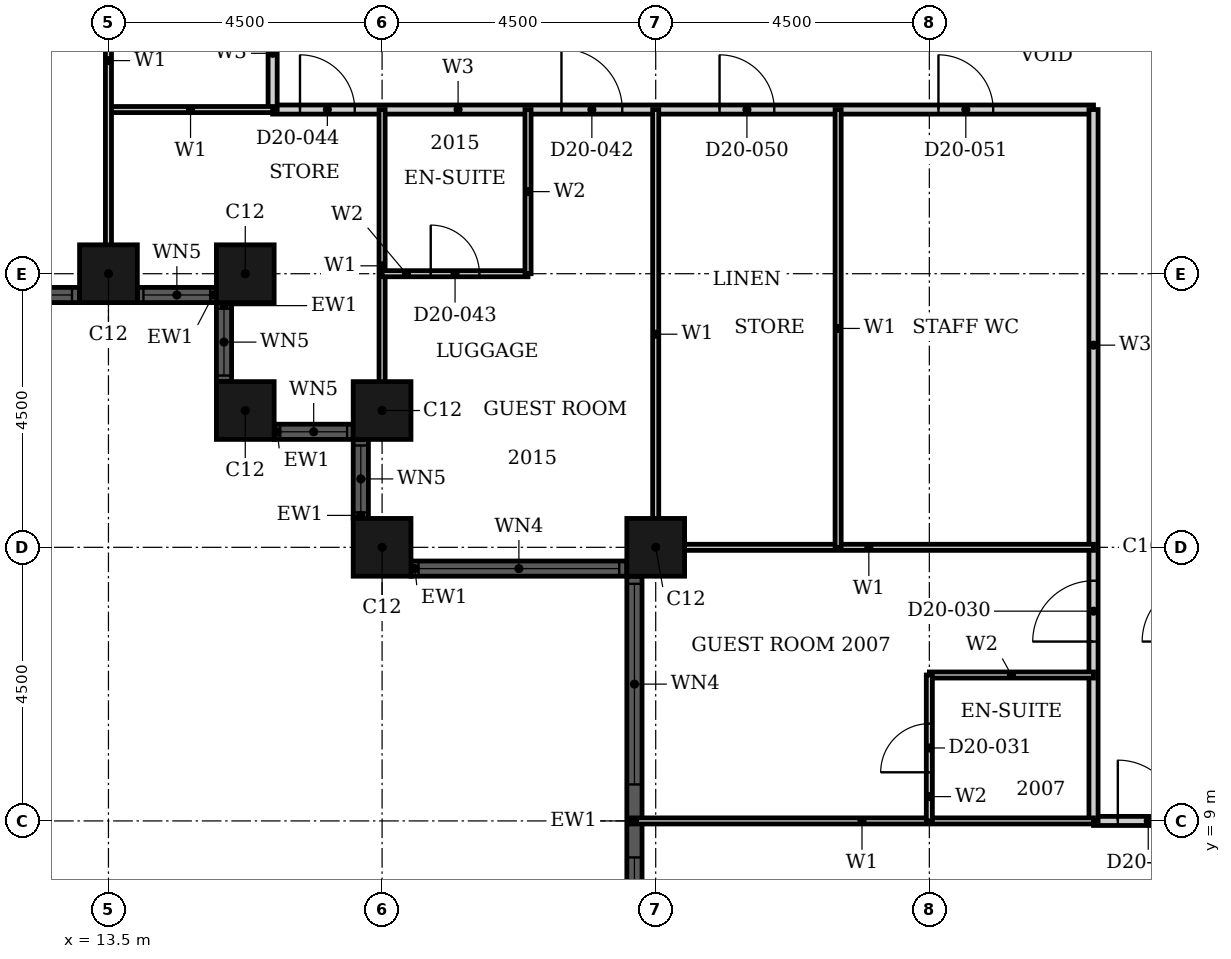
"""IFC4 building model, lengths in metres.
Left out: names, types, materials, properties, quantities, classifications, styles, units other than length and angle.
Written with IfcOpenShell. Run it as: python <this file> out.ifc"""

import sys

from ifc_helpers import new_model, si_unit, direction, frame, frame_2d, origin, origin_2d, place, context, subcontext, project, spatial, rectangle, hollow_rectangle, extrude, element, fill, save


model = new_model("IFC4")
c1 = context("Model", 3, precision=1e-05, world=origin(), true_north=direction((0.0, 1.0)))
c2 = subcontext(c1, "Body", "Model", "MODEL_VIEW")
j1 = project(units=[si_unit("LENGTHUNIT", "METRE"), si_unit("PLANEANGLEUNIT", "RADIAN")], contexts=[c1])
p1 = place(None, origin())
s1 = spatial("IfcSite", under=j1, at=p1, CompositionType="ELEMENT")
p2 = place(p1, origin())
s2 = spatial("IfcBuilding", under=s1, at=p2, CompositionType="ELEMENT")
p3 = place(p2, frame((0.0, 0.0, 85.2)))
s3 = spatial("IfcBuildingStorey", under=s2, at=p3, CompositionType="ELEMENT", Elevation=85.2)
for number, where, z_axis, x_axis in (
    (1, (13.5, 18.0, 0.0), (0.0, 0.0, 1.0), (1.0, 0.0, 0.0)),
    (2, (15.75, 18.0, 0.0), (0.0, 0.0, 1.0), (1.0, 0.0, 0.0)),
    (3, (15.75, 15.75, 0.0), (0.0, 0.0, 1.0), (1.0, 0.0, 0.0)),
    (4, (18.0, 15.75, 0.0), (0.0, 0.0, 1.0), (1.0, 0.0, 0.0)),
    (5, (18.0, 13.5, 0.0), (0.0, 0.0, 1.0), (1.0, 0.0, 0.0)),
    (6, (22.5, 13.5, 0.0), (0.0, 0.0, 1.0), (1.0, 0.0, 0.0)),
):
    element("IfcColumn", number, at=place(p3, frame(where, z_axis=z_axis, x_axis=x_axis)), inside=s3, PredefinedType="COLUMN", context=c2, shape_type="SweptSolid", body=[
        extrude(hollow_rectangle(XDim=0.95, YDim=0.95, WallThickness=0.03, at=origin_2d()), origin(), (0.0, 0.0, 1.0), 3.6),
    ])
p4 = place(p3, frame((4.975, 17.65, 0.0), z_axis=(0.0, 0.0, 1.0), x_axis=(1.0, 0.0, 0.0)))
e7 = element("IfcWall", 7, at=p4, inside=s3, PredefinedType="SOLIDWALL", context=c2, shape_type="SweptSolid", body=[
    extrude(rectangle(XDim=8.05, YDim=0.25, at=frame_2d((4.025, 0.0))), origin(), (0.0, 0.0, 1.0), 3.6),
])
p5 = place(p4, frame((0.125, 0.0, 0.9)))
e8 = element("IfcOpeningElement", 8, at=p5, cuts=e7, PredefinedType="OPENING", context=c2, shape_type="SweptSolid", body=[
    extrude(rectangle(XDim=3.3, YDim=2.08, at=frame_2d((1.65, 1.04))), frame((0.0, 0.135, 0.0), z_axis=(0.0, -1.0, 0.0), x_axis=(1.0, 0.0, 0.0)), (0.0, 0.0, 1.0), 0.27),
])
p6 = place(p4, frame((4.625, 0.0, 0.9)))
e9 = element("IfcOpeningElement", 9, at=p6, cuts=e7, PredefinedType="OPENING", context=c2, shape_type="SweptSolid", body=[
    extrude(rectangle(XDim=3.3, YDim=2.08, at=frame_2d((1.65, 1.04))), frame((0.0, 0.135, 0.0), z_axis=(0.0, -1.0, 0.0), x_axis=(1.0, 0.0, 0.0)), (0.0, 0.0, 1.0), 0.27),
])
p7 = place(p3, frame((13.975, 17.65, 0.0), z_axis=(0.0, 0.0, 1.0), x_axis=(1.0, 0.0, 0.0)))
e10 = element("IfcWall", 10, at=p7, inside=s3, PredefinedType="SOLIDWALL", context=c2, shape_type="SweptSolid", body=[
    extrude(rectangle(XDim=1.3, YDim=0.25, at=frame_2d((0.65, 0.0))), origin(), (0.0, 0.0, 1.0), 3.6),
])
p8 = place(p7, frame((0.1, 0.0, 0.9)))
e11 = element("IfcOpeningElement", 11, at=p8, cuts=e10, PredefinedType="OPENING", context=c2, shape_type="SweptSolid", body=[
    extrude(rectangle(XDim=1.1, YDim=2.08, at=frame_2d((0.55, 1.04))), frame((0.0, 0.135, 0.0), z_axis=(0.0, -1.0, 0.0), x_axis=(1.0, 0.0, 0.0)), (0.0, 0.0, 1.0), 0.27),
])
p9 = place(p3, frame((15.4, 17.525, 0.0), z_axis=(0.0, 0.0, 1.0), x_axis=(0.0, -1.0, 0.0)))
e12 = element("IfcWall", 12, at=p9, inside=s3, PredefinedType="SOLIDWALL", context=c2, shape_type="SweptSolid", body=[
    extrude(rectangle(XDim=1.3, YDim=0.25, at=frame_2d((0.65, 0.0))), origin(), (0.0, 0.0, 1.0), 3.6),
])
p10 = place(p9, frame((0.1, 0.0, 0.9)))
e13 = element("IfcOpeningElement", 13, at=p10, cuts=e12, PredefinedType="OPENING", context=c2, shape_type="SweptSolid", body=[
    extrude(rectangle(XDim=1.1, YDim=2.08, at=frame_2d((0.55, 1.04))), frame((0.0, 0.135, 0.0), z_axis=(0.0, -1.0, 0.0), x_axis=(1.0, 0.0, 0.0)), (0.0, 0.0, 1.0), 0.27),
])
p11 = place(p3, frame((16.225, 15.4, 0.0), z_axis=(0.0, 0.0, 1.0), x_axis=(1.0, 0.0, 0.0)))
e14 = element("IfcWall", 14, at=p11, inside=s3, PredefinedType="SOLIDWALL", context=c2, shape_type="SweptSolid", body=[
    extrude(rectangle(XDim=1.3, YDim=0.25, at=frame_2d((0.65, 0.0))), origin(), (0.0, 0.0, 1.0), 3.6),
])
p12 = place(p11, frame((0.1, 0.0, 0.9)))
e15 = element("IfcOpeningElement", 15, at=p12, cuts=e14, PredefinedType="OPENING", context=c2, shape_type="SweptSolid", body=[
    extrude(rectangle(XDim=1.1, YDim=2.08, at=frame_2d((0.55, 1.04))), frame((0.0, 0.135, 0.0), z_axis=(0.0, -1.0, 0.0), x_axis=(1.0, 0.0, 0.0)), (0.0, 0.0, 1.0), 0.27),
])
p13 = place(p3, frame((17.65, 15.275, 0.0), z_axis=(0.0, 0.0, 1.0), x_axis=(0.0, -1.0, 0.0)))
e16 = element("IfcWall", 16, at=p13, inside=s3, PredefinedType="SOLIDWALL", context=c2, shape_type="SweptSolid", body=[
    extrude(rectangle(XDim=1.3, YDim=0.25, at=frame_2d((0.65, 0.0))), origin(), (0.0, 0.0, 1.0), 3.6),
])
p14 = place(p13, frame((0.1, 0.0, 0.9)))
e17 = element("IfcOpeningElement", 17, at=p14, cuts=e16, PredefinedType="OPENING", context=c2, shape_type="SweptSolid", body=[
    extrude(rectangle(XDim=1.1, YDim=2.08, at=frame_2d((0.55, 1.04))), frame((0.0, 0.135, 0.0), z_axis=(0.0, -1.0, 0.0), x_axis=(1.0, 0.0, 0.0)), (0.0, 0.0, 1.0), 0.27),
])
p15 = place(p3, frame((18.475, 13.15, 0.0), z_axis=(0.0, 0.0, 1.0), x_axis=(1.0, 0.0, 0.0)))
e18 = element("IfcWall", 18, at=p15, inside=s3, PredefinedType="SOLIDWALL", context=c2, shape_type="SweptSolid", body=[
    extrude(rectangle(XDim=3.55, YDim=0.25, at=frame_2d((1.775, 0.0))), origin(), (0.0, 0.0, 1.0), 3.6),
])
p16 = place(p15, frame((0.125, 0.0, 0.9)))
e19 = element("IfcOpeningElement", 19, at=p16, cuts=e18, PredefinedType="OPENING", context=c2, shape_type="SweptSolid", body=[
    extrude(rectangle(XDim=3.3, YDim=2.08, at=frame_2d((1.65, 1.04))), frame((0.0, 0.135, 0.0), z_axis=(0.0, -1.0, 0.0), x_axis=(1.0, 0.0, 0.0)), (0.0, 0.0, 1.0), 0.27),
])
p17 = place(p3, frame((22.15, 13.025, 0.0), z_axis=(0.0, 0.0, 1.0), x_axis=(0.0, -1.0, 0.0)))
e20 = element("IfcWall", 20, at=p17, inside=s3, PredefinedType="SOLIDWALL", context=c2, shape_type="SweptSolid", body=[
    extrude(rectangle(XDim=8.05, YDim=0.25, at=frame_2d((4.025, 0.0))), origin(), (0.0, 0.0, 1.0), 3.6),
])
p18 = place(p17, frame((0.125, 0.0, 0.9)))
e21 = element("IfcOpeningElement", 21, at=p18, cuts=e20, PredefinedType="OPENING", context=c2, shape_type="SweptSolid", body=[
    extrude(rectangle(XDim=3.3, YDim=2.08, at=frame_2d((1.65, 1.04))), frame((0.0, 0.135, 0.0), z_axis=(0.0, -1.0, 0.0), x_axis=(1.0, 0.0, 0.0)), (0.0, 0.0, 1.0), 0.27),
])
p19 = place(p17, frame((4.625, 0.0, 0.9)))
e22 = element("IfcOpeningElement", 22, at=p19, cuts=e20, PredefinedType="OPENING", context=c2, shape_type="SweptSolid", body=[
    extrude(rectangle(XDim=3.3, YDim=2.08, at=frame_2d((1.65, 1.04))), frame((0.0, 0.135, 0.0), z_axis=(0.0, -1.0, 0.0), x_axis=(1.0, 0.0, 0.0)), (0.0, 0.0, 1.0), 0.27),
])
p20 = place(p3, frame((16.2, 20.7, 0.0), z_axis=(0.0, 0.0, 1.0), x_axis=(1.0, 0.0, 0.0)))
e23 = element("IfcWall", 23, at=p20, inside=s3, PredefinedType="PARTITIONING", context=c2, shape_type="SweptSolid", body=[
    extrude(rectangle(XDim=13.5, YDim=0.15, at=frame_2d((6.75, 0.0))), origin(), (0.0, 0.0, 1.0), 3.3),
])
p21 = place(p20, frame((4.75, 0.0, 0.0)))
e24 = element("IfcOpeningElement", 24, at=p21, cuts=e23, PredefinedType="OPENING", context=c2, shape_type="SweptSolid", body=[
    extrude(rectangle(XDim=1.0, YDim=2.1, at=frame_2d((0.5, 1.05))), frame((0.0, 0.085, 0.0), z_axis=(0.0, -1.0, 0.0), x_axis=(1.0, 0.0, 0.0)), (0.0, 0.0, 1.0), 0.17),
])
p22 = place(p20, frame((0.45, 0.0, 0.0)))
e25 = element("IfcOpeningElement", 25, at=p22, cuts=e23, PredefinedType="OPENING", context=c2, shape_type="SweptSolid", body=[
    extrude(rectangle(XDim=0.9, YDim=2.1, at=frame_2d((0.45, 1.05))), frame((0.0, 0.085, 0.0), z_axis=(0.0, -1.0, 0.0), x_axis=(1.0, 0.0, 0.0)), (0.0, 0.0, 1.0), 0.17),
])
p23 = place(p20, frame((7.35, 0.0, 0.0)))
e26 = element("IfcOpeningElement", 26, at=p23, cuts=e23, PredefinedType="OPENING", context=c2, shape_type="SweptSolid", body=[
    extrude(rectangle(XDim=0.9, YDim=2.1, at=frame_2d((0.45, 1.05))), frame((0.0, 0.085, 0.0), z_axis=(0.0, -1.0, 0.0), x_axis=(1.0, 0.0, 0.0)), (0.0, 0.0, 1.0), 0.17),
])
p24 = place(p20, frame((10.95, 0.0, 0.0)))
e27 = element("IfcOpeningElement", 27, at=p24, cuts=e23, PredefinedType="OPENING", context=c2, shape_type="SweptSolid", body=[
    extrude(rectangle(XDim=0.9, YDim=2.1, at=frame_2d((0.45, 1.05))), frame((0.0, 0.085, 0.0), z_axis=(0.0, -1.0, 0.0), x_axis=(1.0, 0.0, 0.0)), (0.0, 0.0, 1.0), 0.17),
])
p25 = place(p3, frame((29.7, 9.0, 0.0), z_axis=(0.0, 0.0, 1.0), x_axis=(1.0, 0.0, 0.0)))
e28 = element("IfcWall", 28, at=p25, inside=s3, PredefinedType="PARTITIONING", context=c2, shape_type="SweptSolid", body=[
    extrude(rectangle(XDim=1.8, YDim=0.15, at=frame_2d((0.9, 0.0))), origin(), (0.0, 0.0, 1.0), 3.3),
])
p26 = place(p25, frame((0.4, 0.0, 0.0)))
e29 = element("IfcOpeningElement", 29, at=p26, cuts=e28, PredefinedType="OPENING", context=c2, shape_type="SweptSolid", body=[
    extrude(rectangle(XDim=1.0, YDim=2.1, at=frame_2d((0.5, 1.05))), frame((0.0, 0.085, 0.0), z_axis=(0.0, -1.0, 0.0), x_axis=(1.0, 0.0, 0.0)), (0.0, 0.0, 1.0), 0.17),
])
p27 = place(p3, frame((16.2, 20.7, 0.0), z_axis=(0.0, 0.0, 1.0), x_axis=(0.0, 1.0, 0.0)))
e30 = element("IfcWall", 30, at=p27, inside=s3, PredefinedType="PARTITIONING", context=c2, shape_type="SweptSolid", body=[
    extrude(rectangle(XDim=4.5, YDim=0.15, at=frame_2d((2.25, 0.0))), origin(), (0.0, 0.0, 1.0), 3.3),
])
p28 = place(p27, frame((1.85, 0.0, 0.0)))
e31 = element("IfcOpeningElement", 31, at=p28, cuts=e30, PredefinedType="OPENING", context=c2, shape_type="SweptSolid", body=[
    extrude(rectangle(XDim=0.9, YDim=2.1, at=frame_2d((0.45, 1.05))), frame((0.0, 0.085, 0.0), z_axis=(0.0, -1.0, 0.0), x_axis=(1.0, 0.0, 0.0)), (0.0, 0.0, 1.0), 0.17),
])
p29 = place(p3, frame((29.7, 9.0, 0.0), z_axis=(0.0, 0.0, 1.0), x_axis=(0.0, 1.0, 0.0)))
e32 = element("IfcWall", 32, at=p29, inside=s3, PredefinedType="PARTITIONING", context=c2, shape_type="SweptSolid", body=[
    extrude(rectangle(XDim=11.7, YDim=0.15, at=frame_2d((5.85, 0.0))), origin(), (0.0, 0.0, 1.0), 3.3),
])
p30 = place(p29, frame((2.95, 0.0, 0.0)))
e33 = element("IfcOpeningElement", 33, at=p30, cuts=e32, PredefinedType="OPENING", context=c2, shape_type="SweptSolid", body=[
    extrude(rectangle(XDim=1.0, YDim=2.1, at=frame_2d((0.5, 1.05))), frame((0.0, 0.085, 0.0), z_axis=(0.0, -1.0, 0.0), x_axis=(1.0, 0.0, 0.0)), (0.0, 0.0, 1.0), 0.17),
])
p31 = place(p3, frame((22.31, 13.5, 0.0), z_axis=(0.0, 0.0, 1.0), x_axis=(1.0, 0.0, 0.0)))
e34 = element("IfcWall", 34, at=p31, inside=s3, PredefinedType="PARTITIONING", context=c2, shape_type="SweptSolid", body=[
    extrude(rectangle(XDim=7.39, YDim=0.1, at=frame_2d((3.695, 0.0))), origin(), (0.0, 0.0, 1.0), 2.38),
])
p32 = place(p3, frame((13.5, 20.7, 0.0), z_axis=(0.0, 0.0, 1.0), x_axis=(1.0, 0.0, 0.0)))
e35 = element("IfcWall", 35, at=p32, inside=s3, PredefinedType="PARTITIONING", context=c2, shape_type="SweptSolid", body=[
    extrude(rectangle(XDim=2.7, YDim=0.1, at=frame_2d((1.35, 0.0))), origin(), (0.0, 0.0, 1.0), 3.3),
])
p33 = place(p3, frame((22.085, 9.0, 0.0), z_axis=(0.0, 0.0, 1.0), x_axis=(1.0, 0.0, 0.0)))
e36 = element("IfcWall", 36, at=p33, inside=s3, PredefinedType="PARTITIONING", context=c2, shape_type="SweptSolid", body=[
    extrude(rectangle(XDim=7.615, YDim=0.1, at=frame_2d((3.808, 0.0))), origin(), (0.0, 0.0, 1.0), 3.3),
])
p34 = place(p3, frame((13.5, 17.81, 0.0), z_axis=(0.0, 0.0, 1.0), x_axis=(0.0, 1.0, 0.0)))
e37 = element("IfcWall", 37, at=p34, inside=s3, PredefinedType="PARTITIONING", context=c2, shape_type="SweptSolid", body=[
    extrude(rectangle(XDim=7.39, YDim=0.1, at=frame_2d((3.695, 0.0))), origin(), (0.0, 0.0, 1.0), 2.38),
])
p35 = place(p3, frame((18.0, 15.56, 0.0), z_axis=(0.0, 0.0, 1.0), x_axis=(0.0, 1.0, 0.0)))
e38 = element("IfcWall", 38, at=p35, inside=s3, PredefinedType="PARTITIONING", context=c2, shape_type="SweptSolid", body=[
    extrude(rectangle(XDim=5.14, YDim=0.1, at=frame_2d((2.57, 0.0))), origin(), (0.0, 0.0, 1.0), 3.3),
])
p36 = place(p3, frame((22.5, 13.31, 0.0), z_axis=(0.0, 0.0, 1.0), x_axis=(0.0, 1.0, 0.0)))
e39 = element("IfcWall", 39, at=p36, inside=s3, PredefinedType="PARTITIONING", context=c2, shape_type="SweptSolid", body=[
    extrude(rectangle(XDim=7.39, YDim=0.1, at=frame_2d((3.695, 0.0))), origin(), (0.0, 0.0, 1.0), 3.3),
])
p37 = place(p3, frame((25.5, 13.5, 0.0), z_axis=(0.0, 0.0, 1.0), x_axis=(0.0, 1.0, 0.0)))
e40 = element("IfcWall", 40, at=p37, inside=s3, PredefinedType="PARTITIONING", context=c2, shape_type="SweptSolid", body=[
    extrude(rectangle(XDim=7.2, YDim=0.1, at=frame_2d((3.6, 0.0))), origin(), (0.0, 0.0, 1.0), 3.3),
])
p38 = place(p3, frame((27.0, 11.4, 0.0), z_axis=(0.0, 0.0, 1.0), x_axis=(1.0, 0.0, 0.0)))
e41 = element("IfcWall", 41, at=p38, inside=s3, PredefinedType="PARTITIONING", context=c2, shape_type="SweptSolid", body=[
    extrude(rectangle(XDim=2.7, YDim=0.1, at=frame_2d((1.35, 0.0))), origin(), (0.0, 0.0, 1.0), 3.3),
])
p39 = place(p3, frame((18.0, 18.0, 0.0), z_axis=(0.0, 0.0, 1.0), x_axis=(1.0, 0.0, 0.0)))
e42 = element("IfcWall", 42, at=p39, inside=s3, PredefinedType="PARTITIONING", context=c2, shape_type="SweptSolid", body=[
    extrude(rectangle(XDim=2.4, YDim=0.1, at=frame_2d((1.2, 0.0))), origin(), (0.0, 0.0, 1.0), 3.3),
])
p40 = place(p39, frame((0.8, 0.0, 0.0)))
e43 = element("IfcOpeningElement", 43, at=p40, cuts=e42, PredefinedType="OPENING", context=c2, shape_type="SweptSolid", body=[
    extrude(rectangle(XDim=0.8, YDim=2.1, at=frame_2d((0.4, 1.05))), frame((0.0, 0.06, 0.0), z_axis=(0.0, -1.0, 0.0), x_axis=(1.0, 0.0, 0.0)), (0.0, 0.0, 1.0), 0.12),
])
p41 = place(p3, frame((20.4, 18.0, 0.0), z_axis=(0.0, 0.0, 1.0), x_axis=(0.0, 1.0, 0.0)))
e44 = element("IfcWall", 44, at=p41, inside=s3, PredefinedType="PARTITIONING", context=c2, shape_type="SweptSolid", body=[
    extrude(rectangle(XDim=2.7, YDim=0.1, at=frame_2d((1.35, 0.0))), origin(), (0.0, 0.0, 1.0), 3.3),
])
p42 = place(p3, frame((27.0, 9.0, 0.0), z_axis=(0.0, 0.0, 1.0), x_axis=(0.0, 1.0, 0.0)))
e45 = element("IfcWall", 45, at=p42, inside=s3, PredefinedType="PARTITIONING", context=c2, shape_type="SweptSolid", body=[
    extrude(rectangle(XDim=2.4, YDim=0.1, at=frame_2d((1.2, 0.0))), origin(), (0.0, 0.0, 1.0), 2.58),
])
p43 = place(p42, frame((0.8, 0.0, 0.0)))
e46 = element("IfcOpeningElement", 46, at=p43, cuts=e45, PredefinedType="OPENING", context=c2, shape_type="SweptSolid", body=[
    extrude(rectangle(XDim=0.8, YDim=2.1, at=frame_2d((0.4, 1.05))), frame((0.0, 0.06, 0.0), z_axis=(0.0, -1.0, 0.0), x_axis=(1.0, 0.0, 0.0)), (0.0, 0.0, 1.0), 0.12),
])
p44 = place(p6, origin())
e47 = element("IfcWindow", 47, at=p44, inside=s3, PartitioningType="SINGLE_PANEL", PredefinedType="WINDOW", context=c2, shape_type="SweptSolid", body=[
    extrude(rectangle(XDim=3.3, YDim=2.08, at=frame_2d((1.65, 1.04))), frame((0.0, 0.03, 0.0), z_axis=(0.0, -1.0, 0.0), x_axis=(1.0, 0.0, 0.0)), (0.0, 0.0, 1.0), 0.06),
])
fill(e9, e47)
p45 = place(p8, origin())
e48 = element("IfcWindow", 48, at=p45, inside=s3, PartitioningType="SINGLE_PANEL", PredefinedType="WINDOW", context=c2, shape_type="SweptSolid", body=[
    extrude(rectangle(XDim=1.1, YDim=2.08, at=frame_2d((0.55, 1.04))), frame((0.0, 0.03, 0.0), z_axis=(0.0, -1.0, 0.0), x_axis=(1.0, 0.0, 0.0)), (0.0, 0.0, 1.0), 0.06),
])
fill(e11, e48)
p46 = place(p10, origin())
e49 = element("IfcWindow", 49, at=p46, inside=s3, PartitioningType="SINGLE_PANEL", PredefinedType="WINDOW", context=c2, shape_type="SweptSolid", body=[
    extrude(rectangle(XDim=1.1, YDim=2.08, at=frame_2d((0.55, 1.04))), frame((0.0, 0.03, 0.0), z_axis=(0.0, -1.0, 0.0), x_axis=(1.0, 0.0, 0.0)), (0.0, 0.0, 1.0), 0.06),
])
fill(e13, e49)
p47 = place(p12, origin())
e50 = element("IfcWindow", 50, at=p47, inside=s3, PartitioningType="SINGLE_PANEL", PredefinedType="WINDOW", context=c2, shape_type="SweptSolid", body=[
    extrude(rectangle(XDim=1.1, YDim=2.08, at=frame_2d((0.55, 1.04))), frame((0.0, 0.03, 0.0), z_axis=(0.0, -1.0, 0.0), x_axis=(1.0, 0.0, 0.0)), (0.0, 0.0, 1.0), 0.06),
])
fill(e15, e50)
p48 = place(p14, origin())
e51 = element("IfcWindow", 51, at=p48, inside=s3, PartitioningType="SINGLE_PANEL", PredefinedType="WINDOW", context=c2, shape_type="SweptSolid", body=[
    extrude(rectangle(XDim=1.1, YDim=2.08, at=frame_2d((0.55, 1.04))), frame((0.0, 0.03, 0.0), z_axis=(0.0, -1.0, 0.0), x_axis=(1.0, 0.0, 0.0)), (0.0, 0.0, 1.0), 0.06),
])
fill(e17, e51)
p49 = place(p16, origin())
e52 = element("IfcWindow", 52, at=p49, inside=s3, PartitioningType="SINGLE_PANEL", PredefinedType="WINDOW", context=c2, shape_type="SweptSolid", body=[
    extrude(rectangle(XDim=3.3, YDim=2.08, at=frame_2d((1.65, 1.04))), frame((0.0, 0.03, 0.0), z_axis=(0.0, -1.0, 0.0), x_axis=(1.0, 0.0, 0.0)), (0.0, 0.0, 1.0), 0.06),
])
fill(e19, e52)
p50 = place(p18, origin())
e53 = element("IfcWindow", 53, at=p50, inside=s3, PartitioningType="SINGLE_PANEL", PredefinedType="WINDOW", context=c2, shape_type="SweptSolid", body=[
    extrude(rectangle(XDim=3.3, YDim=2.08, at=frame_2d((1.65, 1.04))), frame((0.0, 0.03, 0.0), z_axis=(0.0, -1.0, 0.0), x_axis=(1.0, 0.0, 0.0)), (0.0, 0.0, 1.0), 0.06),
])
fill(e21, e53)
p51 = place(p19, origin())
e54 = element("IfcWindow", 54, at=p51, inside=s3, PartitioningType="SINGLE_PANEL", PredefinedType="WINDOW", context=c2, shape_type="SweptSolid", body=[
    extrude(rectangle(XDim=3.3, YDim=2.08, at=frame_2d((1.65, 1.04))), frame((0.0, 0.03, 0.0), z_axis=(0.0, -1.0, 0.0), x_axis=(1.0, 0.0, 0.0)), (0.0, 0.0, 1.0), 0.06),
])
fill(e22, e54)
p52 = place(p30, origin())
e55 = element("IfcDoor", 55, at=p52, inside=s3, OperationType="SINGLE_SWING_RIGHT", PredefinedType="DOOR", context=c2, shape_type="SweptSolid", body=[
    extrude(rectangle(XDim=1.0, YDim=2.1, at=frame_2d((0.5, 1.05))), frame((0.0, 0.025, 0.0), z_axis=(0.0, -1.0, 0.0), x_axis=(1.0, 0.0, 0.0)), (0.0, 0.0, 1.0), 0.05),
])
fill(e33, e55)
p53 = place(p43, origin())
e56 = element("IfcDoor", 56, at=p53, inside=s3, OperationType="SINGLE_SWING_LEFT", PredefinedType="DOOR", context=c2, shape_type="SweptSolid", body=[
    extrude(rectangle(XDim=0.8, YDim=2.1, at=frame_2d((0.4, 1.05))), frame((0.0, 0.025, 0.0), z_axis=(0.0, -1.0, 0.0), x_axis=(1.0, 0.0, 0.0)), (0.0, 0.0, 1.0), 0.05),
])
fill(e46, e56)
p54 = place(p26, origin())
e57 = element("IfcDoor", 57, at=p54, inside=s3, OperationType="SINGLE_SWING_LEFT", PredefinedType="DOOR", context=c2, shape_type="SweptSolid", body=[
    extrude(rectangle(XDim=1.0, YDim=2.1, at=frame_2d((0.5, 1.05))), frame((0.0, 0.025, 0.0), z_axis=(0.0, -1.0, 0.0), x_axis=(1.0, 0.0, 0.0)), (0.0, 0.0, 1.0), 0.05),
])
fill(e29, e57)
p55 = place(p21, origin())
e58 = element("IfcDoor", 58, at=p55, inside=s3, OperationType="SINGLE_SWING_RIGHT", PredefinedType="DOOR", context=c2, shape_type="SweptSolid", body=[
    extrude(rectangle(XDim=1.0, YDim=2.1, at=frame_2d((0.5, 1.05))), frame((0.0, 0.025, 0.0), z_axis=(0.0, -1.0, 0.0), x_axis=(1.0, 0.0, 0.0)), (0.0, 0.0, 1.0), 0.05),
])
fill(e24, e58)
p56 = place(p40, origin())
e59 = element("IfcDoor", 59, at=p56, inside=s3, OperationType="SINGLE_SWING_LEFT", PredefinedType="DOOR", context=c2, shape_type="SweptSolid", body=[
    extrude(rectangle(XDim=0.8, YDim=2.1, at=frame_2d((0.4, 1.05))), frame((0.0, 0.025, 0.0), z_axis=(0.0, -1.0, 0.0), x_axis=(1.0, 0.0, 0.0)), (0.0, 0.0, 1.0), 0.05),
])
fill(e43, e59)
p57 = place(p22, origin())
e60 = element("IfcDoor", 60, at=p57, inside=s3, OperationType="SINGLE_SWING_RIGHT", PredefinedType="DOOR", context=c2, shape_type="SweptSolid", body=[
    extrude(rectangle(XDim=0.9, YDim=2.1, at=frame_2d((0.45, 1.05))), frame((0.0, 0.025, 0.0), z_axis=(0.0, -1.0, 0.0), x_axis=(1.0, 0.0, 0.0)), (0.0, 0.0, 1.0), 0.05),
])
fill(e25, e60)
p58 = place(p23, origin())
e61 = element("IfcDoor", 61, at=p58, inside=s3, OperationType="SINGLE_SWING_RIGHT", PredefinedType="DOOR", context=c2, shape_type="SweptSolid", body=[
    extrude(rectangle(XDim=0.9, YDim=2.1, at=frame_2d((0.45, 1.05))), frame((0.0, 0.025, 0.0), z_axis=(0.0, -1.0, 0.0), x_axis=(1.0, 0.0, 0.0)), (0.0, 0.0, 1.0), 0.05),
])
fill(e26, e61)
p59 = place(p24, origin())
e62 = element("IfcDoor", 62, at=p59, inside=s3, OperationType="SINGLE_SWING_RIGHT", PredefinedType="DOOR", context=c2, shape_type="SweptSolid", body=[
    extrude(rectangle(XDim=0.9, YDim=2.1, at=frame_2d((0.45, 1.05))), frame((0.0, 0.025, 0.0), z_axis=(0.0, -1.0, 0.0), x_axis=(1.0, 0.0, 0.0)), (0.0, 0.0, 1.0), 0.05),
])
fill(e27, e62)
save(model, sys.argv[1])
